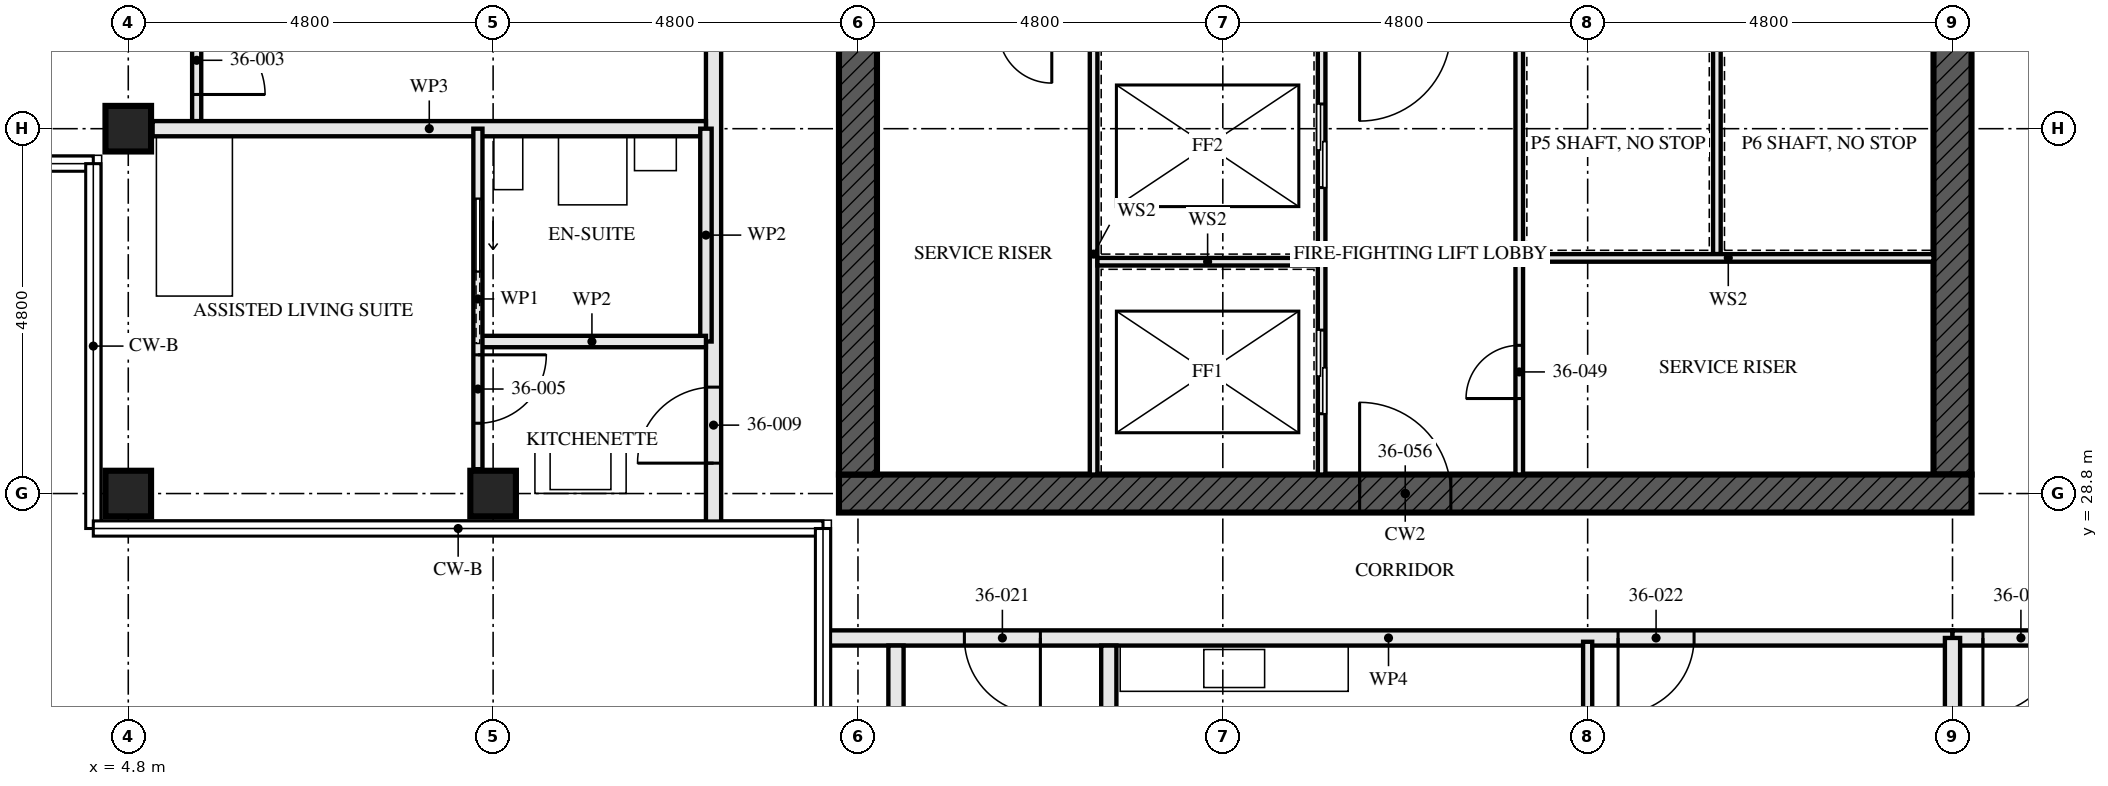
"""IFC4 building model, lengths in metres.
Left out: names, types, materials, properties, quantities, classifications, styles, units other than length and angle.
Written with IfcOpenShell. Run it as: python <this file> out.ifc"""

import sys

from ifc_helpers import new_model, si_unit, direction, frame, frame_2d, origin, origin_2d, place, context, subcontext, project, spatial, rectangle, hollow_rectangle, extrude, element, fill, save


model = new_model("IFC4")
c1 = context("Model", 3, precision=1e-05, world=origin(), true_north=direction((0.0, 1.0)))
c2 = subcontext(c1, "Body", "Model", "MODEL_VIEW")
j1 = project(units=[si_unit("LENGTHUNIT", "METRE"), si_unit("PLANEANGLEUNIT", "RADIAN")], contexts=[c1])
p1 = place(None, origin())
s1 = spatial("IfcSite", under=j1, at=p1, CompositionType="ELEMENT")
p2 = place(p1, origin())
s2 = spatial("IfcBuilding", under=s1, at=p2, CompositionType="ELEMENT")
p3 = place(p2, frame((0.0, 0.0, 133.0)))
s3 = spatial("IfcBuildingStorey", under=s2, at=p3, CompositionType="ELEMENT", Elevation=133.0)
for number, where, z_axis, x_axis in (
    (1, (4.8, 28.8, 0.0), (0.0, 0.0, 1.0), (0.0, 1.0, 0.0)),
    (2, (4.8, 33.6, 0.0), (0.0, 0.0, 1.0), (0.0, 1.0, 0.0)),
    (3, (9.6, 28.8, 0.0), (0.0, 0.0, 1.0), (0.0, 1.0, 0.0)),
):
    element("IfcColumn", number, at=place(p3, frame(where, z_axis=z_axis, x_axis=x_axis)), inside=s3, PredefinedType="COLUMN", context=c2, shape_type="SweptSolid", body=[
        extrude(hollow_rectangle(XDim=0.6, YDim=0.6, WallThickness=0.08, at=origin_2d()), origin(), (0.0, 0.0, 1.0), 3.5),
    ])
p4 = place(p3, frame((14.15, 28.8, -0.17), z_axis=(0.0, 0.0, 1.0), x_axis=(1.0, 0.0, 0.0)))
e4 = element("IfcWall", 4, at=p4, inside=s3, PredefinedType="SHEAR", context=c2, shape_type="SweptSolid", body=[
    extrude(rectangle(XDim=14.9, YDim=0.5, at=frame_2d((7.45, 0.0))), origin(), (0.0, 0.0, 1.0), 3.42),
])
p5 = place(p4, frame((6.85, 0.0, 0.17)))
e5 = element("IfcOpeningElement", 5, at=p5, cuts=e4, PredefinedType="OPENING", context=c2, shape_type="SweptSolid", body=[
    extrude(rectangle(XDim=1.2, YDim=2.1, at=frame_2d((0.6, 1.05))), frame((0.0, 0.26, 0.0), z_axis=(0.0, -1.0, 0.0), x_axis=(1.0, 0.0, 0.0)), (0.0, 0.0, 1.0), 0.521),
])
p6 = place(p3, frame((14.4, 42.95, -0.17), z_axis=(0.0, 0.0, 1.0), x_axis=(0.0, -1.0, 0.0)))
e6 = element("IfcWall", 6, at=p6, inside=s3, PredefinedType="SHEAR", context=c2, shape_type="SweptSolid", body=[
    extrude(rectangle(XDim=13.9, YDim=0.5, at=frame_2d((6.95, 0.0))), origin(), (0.0, 0.0, 1.0), 3.42),
])
p7 = place(p6, frame((6.35, 0.0, 0.17)))
e7 = element("IfcOpeningElement", 7, at=p7, cuts=e6, PredefinedType="OPENING", context=c2, shape_type="SweptSolid", body=[
    extrude(rectangle(XDim=1.2, YDim=2.1, at=frame_2d((0.6, 1.05))), frame((0.0, 0.26, 0.0), z_axis=(0.0, -1.0, 0.0), x_axis=(1.0, 0.0, 0.0)), (0.0, 0.0, 1.0), 0.521),
])
p8 = place(p3, frame((28.8, 29.05, -0.17), z_axis=(0.0, 0.0, 1.0), x_axis=(0.0, 1.0, 0.0)))
e8 = element("IfcWall", 8, at=p8, inside=s3, PredefinedType="SHEAR", context=c2, shape_type="SweptSolid", body=[
    extrude(rectangle(XDim=13.9, YDim=0.5, at=frame_2d((6.95, 0.0))), origin(), (0.0, 0.0, 1.0), 3.42),
])
p9 = place(p8, frame((6.35, 0.0, 0.17)))
e9 = element("IfcOpeningElement", 9, at=p9, cuts=e8, PredefinedType="OPENING", context=c2, shape_type="SweptSolid", body=[
    extrude(rectangle(XDim=1.2, YDim=2.1, at=frame_2d((0.6, 1.05))), frame((0.0, 0.26, 0.0), z_axis=(0.0, -1.0, 0.0), x_axis=(1.0, 0.0, 0.0)), (0.0, 0.0, 1.0), 0.521),
])
p10 = place(p3, frame((5.7, 38.4, 0.0), z_axis=(0.0, 0.0, 1.0), x_axis=(0.0, -1.0, 0.0)))
e10 = element("IfcWall", 10, at=p10, inside=s3, PredefinedType="PARTITIONING", context=c2, shape_type="SweptSolid", body=[
    extrude(rectangle(XDim=4.8, YDim=0.12, at=frame_2d((2.4, 0.0))), origin(), (0.0, 0.0, 1.0), 3.25),
])
p11 = place(p10, frame((3.45, 0.0, 0.0)))
e11 = element("IfcOpeningElement", 11, at=p11, cuts=e10, PredefinedType="OPENING", context=c2, shape_type="SweptSolid", body=[
    extrude(rectangle(XDim=0.9, YDim=2.1, at=frame_2d((0.45, 1.05))), frame((0.0, 0.071, 0.0), z_axis=(0.0, -1.0, 0.0), x_axis=(1.0, 0.0, 0.0)), (0.0, 0.0, 1.0), 0.141),
])
p12 = place(p10, frame((0.925, 0.0, 0.0)))
e12 = element("IfcOpeningElement", 12, at=p12, cuts=e10, PredefinedType="OPENING", context=c2, shape_type="SweptSolid", body=[
    extrude(rectangle(XDim=0.95, YDim=2.1, at=frame_2d((0.475, 1.05))), frame((0.0, 0.071, 0.0), z_axis=(0.0, -1.0, 0.0), x_axis=(1.0, 0.0, 0.0)), (0.0, 0.0, 1.0), 0.141),
])
p13 = place(p3, frame((5.12, 33.6, 0.0), z_axis=(0.0, 0.0, 1.0), x_axis=(1.0, 0.0, 0.0)))
e13 = element("IfcWall", 13, at=p13, inside=s3, PredefinedType="PARTITIONING", context=c2, shape_type="SweptSolid", body=[
    extrude(rectangle(XDim=7.28, YDim=0.2, at=frame_2d((3.64, 0.0))), origin(), (0.0, 0.0, 1.0), 2.24),
])
p14 = place(p3, frame((9.4, 30.8, 0.0), z_axis=(0.0, 0.0, 1.0), x_axis=(1.0, 0.0, 0.0)))
e14 = element("IfcWall", 14, at=p14, inside=s3, PredefinedType="PARTITIONING", context=c2, shape_type="SweptSolid", body=[
    extrude(rectangle(XDim=3.0, YDim=0.15, at=frame_2d((1.5, 0.0))), origin(), (0.0, 0.0, 1.0), 3.25),
])
p15 = place(p3, frame((12.4, 33.6, 0.0), z_axis=(0.0, 0.0, 1.0), x_axis=(0.0, -1.0, 0.0)))
e15 = element("IfcWall", 15, at=p15, inside=s3, PredefinedType="PARTITIONING", context=c2, shape_type="SweptSolid", body=[
    extrude(rectangle(XDim=2.8, YDim=0.15, at=frame_2d((1.4, 0.0))), origin(), (0.0, 0.0, 1.0), 3.25),
])
p16 = place(p3, frame((9.4, 33.6, 0.0), z_axis=(0.0, 0.0, 1.0), x_axis=(0.0, -1.0, 0.0)))
e16 = element("IfcWall", 16, at=p16, inside=s3, PredefinedType="PARTITIONING", context=c2, shape_type="SweptSolid", body=[
    extrude(rectangle(XDim=4.48, YDim=0.12, at=frame_2d((2.24, 0.0))), origin(), (0.0, 0.0, 1.0), 3.25),
])
p17 = place(p16, frame((2.975, 0.0, 0.0)))
e17 = element("IfcOpeningElement", 17, at=p17, cuts=e16, PredefinedType="OPENING", context=c2, shape_type="SweptSolid", body=[
    extrude(rectangle(XDim=0.9, YDim=2.1, at=frame_2d((0.45, 1.05))), frame((0.0, 0.071, 0.0), z_axis=(0.0, -1.0, 0.0), x_axis=(1.0, 0.0, 0.0)), (0.0, 0.0, 1.0), 0.141),
])
p18 = place(p16, frame((0.925, 0.0, 0.0)))
e18 = element("IfcOpeningElement", 18, at=p18, cuts=e16, PredefinedType="OPENING", context=c2, shape_type="SweptSolid", body=[
    extrude(rectangle(XDim=0.95, YDim=2.1, at=frame_2d((0.475, 1.05))), frame((0.0, 0.071, 0.0), z_axis=(0.0, -1.0, 0.0), x_axis=(1.0, 0.0, 0.0)), (0.0, 0.0, 1.0), 0.141),
])
p19 = place(p3, frame((12.5, 43.2, 0.0), z_axis=(0.0, 0.0, 1.0), x_axis=(0.0, -1.0, 0.0)))
e19 = element("IfcWall", 19, at=p19, inside=s3, PredefinedType="PARTITIONING", context=c2, shape_type="SweptSolid", body=[
    extrude(rectangle(XDim=14.84, YDim=0.2, at=frame_2d((7.42, 0.0))), origin(), (0.0, 0.0, 1.0), 2.04),
])
p20 = place(p19, frame((1.4, 0.0, 0.0)))
e20 = element("IfcOpeningElement", 20, at=p20, cuts=e19, PredefinedType="OPENING", context=c2, shape_type="SweptSolid", body=[
    extrude(rectangle(XDim=1.0, YDim=2.0, at=frame_2d((0.5, 1.0))), frame((0.0, 0.111, 0.0), z_axis=(0.0, -1.0, 0.0), x_axis=(1.0, 0.0, 0.0)), (0.0, 0.0, 1.0), 0.221),
])
p21 = place(p19, frame((5.2, 0.0, 0.0)))
e21 = element("IfcOpeningElement", 21, at=p21, cuts=e19, PredefinedType="OPENING", context=c2, shape_type="SweptSolid", body=[
    extrude(rectangle(XDim=1.0, YDim=2.0, at=frame_2d((0.5, 1.0))), frame((0.0, 0.111, 0.0), z_axis=(0.0, -1.0, 0.0), x_axis=(1.0, 0.0, 0.0)), (0.0, 0.0, 1.0), 0.221),
])
p22 = place(p19, frame((13.0, 0.0, 0.0)))
e22 = element("IfcOpeningElement", 22, at=p22, cuts=e19, PredefinedType="OPENING", context=c2, shape_type="SweptSolid", body=[
    extrude(rectangle(XDim=1.0, YDim=2.0, at=frame_2d((0.5, 1.0))), frame((0.0, 0.111, 0.0), z_axis=(0.0, -1.0, 0.0), x_axis=(1.0, 0.0, 0.0)), (0.0, 0.0, 1.0), 0.221),
])
for number, where, z_axis, x_axis in (
    (23, (14.9, 22.1, 0.0), (0.0, 0.0, 1.0), (0.0, 1.0, 0.0)),
    (24, (17.7, 22.1, 0.0), (0.0, 0.0, 1.0), (0.0, 1.0, 0.0)),
):
    element("IfcWall", number, at=place(p3, frame(where, z_axis=z_axis, x_axis=x_axis)), inside=s3, PredefinedType="SOLIDWALL", context=c2, shape_type="SweptSolid", body=[
        extrude(rectangle(XDim=4.7, YDim=0.2, at=frame_2d((2.35, 0.0))), origin(), (0.0, 0.0, 1.0), 2.94),
    ])
p23 = place(p3, frame((24.0, 20.1, 0.0), z_axis=(0.0, 0.0, 1.0), x_axis=(0.0, 1.0, 0.0)))
e25 = element("IfcWall", 25, at=p23, inside=s3, PredefinedType="PARTITIONING", context=c2, shape_type="SweptSolid", body=[
    extrude(rectangle(XDim=6.75, YDim=0.12, at=frame_2d((3.375, 0.0))), origin(), (0.0, 0.0, 1.0), 2.04),
])
p24 = place(p23, frame((2.925, 0.0, 0.0)))
e26 = element("IfcOpeningElement", 26, at=p24, cuts=e25, PredefinedType="OPENING", context=c2, shape_type="SweptSolid", body=[
    extrude(rectangle(XDim=0.9, YDim=2.0, at=frame_2d((0.45, 1.0))), frame((0.0, 0.071, 0.0), z_axis=(0.0, -1.0, 0.0), x_axis=(1.0, 0.0, 0.0)), (0.0, 0.0, 1.0), 0.141),
])
p25 = place(p3, frame((13.96, 26.9, 0.0), z_axis=(0.0, 0.0, 1.0), x_axis=(1.0, 0.0, 0.0)))
e27 = element("IfcWall", 27, at=p25, inside=s3, PredefinedType="PARTITIONING", context=c2, shape_type="SweptSolid", body=[
    extrude(rectangle(XDim=14.84, YDim=0.2, at=frame_2d((7.42, 0.0))), origin(), (0.0, 0.0, 1.0), 2.04),
])
p26 = place(p25, frame((1.84, 0.0, 0.0)))
e28 = element("IfcOpeningElement", 28, at=p26, cuts=e27, PredefinedType="OPENING", context=c2, shape_type="SweptSolid", body=[
    extrude(rectangle(XDim=1.0, YDim=2.0, at=frame_2d((0.5, 1.0))), frame((0.0, 0.111, 0.0), z_axis=(0.0, -1.0, 0.0), x_axis=(1.0, 0.0, 0.0)), (0.0, 0.0, 1.0), 0.221),
])
p27 = place(p25, frame((10.44, 0.0, 0.0)))
e29 = element("IfcOpeningElement", 29, at=p27, cuts=e27, PredefinedType="OPENING", context=c2, shape_type="SweptSolid", body=[
    extrude(rectangle(XDim=1.0, YDim=2.0, at=frame_2d((0.5, 1.0))), frame((0.0, 0.111, 0.0), z_axis=(0.0, -1.0, 0.0), x_axis=(1.0, 0.0, 0.0)), (0.0, 0.0, 1.0), 0.221),
])
p28 = place(p3, frame((28.8, 26.9, 0.0), z_axis=(0.0, 0.0, 1.0), x_axis=(1.0, 0.0, 0.0)))
e30 = element("IfcWall", 30, at=p28, inside=s3, PredefinedType="PARTITIONING", context=c2, shape_type="SweptSolid", body=[
    extrude(rectangle(XDim=9.6, YDim=0.2, at=frame_2d((4.8, 0.0))), origin(), (0.0, 0.0, 1.0), 3.25),
])
p29 = place(p28, frame((0.4, 0.0, 0.0)))
e31 = element("IfcOpeningElement", 31, at=p29, cuts=e30, PredefinedType="OPENING", context=c2, shape_type="SweptSolid", body=[
    extrude(rectangle(XDim=1.0, YDim=2.1, at=frame_2d((0.5, 1.05))), frame((0.0, 0.111, 0.0), z_axis=(0.0, -1.0, 0.0), x_axis=(1.0, 0.0, 0.0)), (0.0, 0.0, 1.0), 0.221),
])
p30 = place(p3, frame((20.5, 29.05, 0.0), z_axis=(0.0, 0.0, 1.0), x_axis=(0.0, 1.0, 0.0)))
e32 = element("IfcWall", 32, at=p30, inside=s3, PredefinedType="SOLIDWALL", context=c2, shape_type="SweptSolid", body=[
    extrude(rectangle(XDim=5.8, YDim=0.1, at=frame_2d((2.9, 0.0))), origin(), (0.0, 0.0, 1.0), 3.25),
])
p31 = place(p30, frame((0.8, 0.0, 0.0)))
e33 = element("IfcOpeningElement", 33, at=p31, cuts=e32, PredefinedType="OPENING", context=c2, shape_type="SweptSolid", body=[
    extrude(rectangle(XDim=1.1, YDim=2.3, at=frame_2d((0.55, 1.15))), frame((0.0, 0.061, 0.0), z_axis=(0.0, -1.0, 0.0), x_axis=(1.0, 0.0, 0.0)), (0.0, 0.0, 1.0), 0.121),
])
p32 = place(p30, frame((3.775, 0.0, 0.0)))
e34 = element("IfcOpeningElement", 34, at=p32, cuts=e32, PredefinedType="OPENING", context=c2, shape_type="SweptSolid", body=[
    extrude(rectangle(XDim=1.1, YDim=2.3, at=frame_2d((0.55, 1.15))), frame((0.0, 0.061, 0.0), z_axis=(0.0, -1.0, 0.0), x_axis=(1.0, 0.0, 0.0)), (0.0, 0.0, 1.0), 0.121),
])
p33 = place(p3, frame((23.1, 29.05, 0.0), z_axis=(0.0, 0.0, 1.0), x_axis=(0.0, 1.0, 0.0)))
e35 = element("IfcWall", 35, at=p33, inside=s3, PredefinedType="SOLIDWALL", context=c2, shape_type="SweptSolid", body=[
    extrude(rectangle(XDim=5.8, YDim=0.1, at=frame_2d((2.9, 0.0))), origin(), (0.0, 0.0, 1.0), 3.25),
])
p34 = place(p33, frame((1.0, 0.0, 0.0)))
e36 = element("IfcOpeningElement", 36, at=p34, cuts=e35, PredefinedType="OPENING", context=c2, shape_type="SweptSolid", body=[
    extrude(rectangle(XDim=0.7, YDim=2.1, at=frame_2d((0.35, 1.05))), frame((0.0, 0.061, 0.0), z_axis=(0.0, -1.0, 0.0), x_axis=(1.0, 0.0, 0.0)), (0.0, 0.0, 1.0), 0.121),
])
p35 = place(p3, frame((17.5, 29.05, 0.0), z_axis=(0.0, 0.0, 1.0), x_axis=(0.0, 1.0, 0.0)))
e37 = element("IfcWall", 37, at=p35, inside=s3, PredefinedType="SOLIDWALL", context=c2, shape_type="SweptSolid", body=[
    extrude(rectangle(XDim=5.8, YDim=0.1, at=frame_2d((2.9, 0.0))), origin(), (0.0, 0.0, 1.0), 3.25),
])
p36 = place(p3, frame((17.55, 31.85, 0.0), z_axis=(0.0, 0.0, 1.0), x_axis=(1.0, 0.0, 0.0)))
e38 = element("IfcWall", 38, at=p36, inside=s3, PredefinedType="SOLIDWALL", context=c2, shape_type="SweptSolid", body=[
    extrude(rectangle(XDim=2.9, YDim=0.1, at=frame_2d((1.45, 0.0))), origin(), (0.0, 0.0, 1.0), 3.25),
])
p37 = place(p3, frame((25.7, 31.95, 0.0), z_axis=(0.0, 0.0, 1.0), x_axis=(0.0, 1.0, 0.0)))
e39 = element("IfcWall", 39, at=p37, inside=s3, PredefinedType="SOLIDWALL", context=c2, shape_type="SweptSolid", body=[
    extrude(rectangle(XDim=2.9, YDim=0.1, at=frame_2d((1.45, 0.0))), origin(), (0.0, 0.0, 1.0), 3.25),
])
p38 = place(p3, frame((23.15, 31.9, 0.0), z_axis=(0.0, 0.0, 1.0), x_axis=(1.0, 0.0, 0.0)))
e40 = element("IfcWall", 40, at=p38, inside=s3, PredefinedType="SOLIDWALL", context=c2, shape_type="SweptSolid", body=[
    extrude(rectangle(XDim=5.4, YDim=0.1, at=frame_2d((2.7, 0.0))), origin(), (0.0, 0.0, 1.0), 3.25),
])
p39 = place(p3, frame((28.8, 24.345, 0.0), z_axis=(0.0, 0.0, 1.0), x_axis=(0.0, 1.0, 0.0)))
e41 = element("IfcWall", 41, at=p39, inside=s3, PredefinedType="PARTITIONING", context=c2, shape_type="SweptSolid", body=[
    extrude(rectangle(XDim=2.555, YDim=0.2, at=frame_2d((1.277, 0.0))), origin(), (0.0, 0.0, 1.0), 2.04),
])
p40 = place(p11, origin())
e42 = element("IfcDoor", 42, at=p40, inside=s3, OperationType="SINGLE_SWING_LEFT", PredefinedType="DOOR", context=c2, shape_type="SweptSolid", body=[
    extrude(rectangle(XDim=0.9, YDim=2.1, at=frame_2d((0.45, 1.05))), frame((0.0, 0.022, 0.0), z_axis=(0.0, -1.0, 0.0), x_axis=(1.0, 0.0, 0.0)), (0.0, 0.0, 1.0), 0.044),
])
fill(e11, e42)
p41 = place(p17, origin())
e43 = element("IfcDoor", 43, at=p41, inside=s3, OperationType="SINGLE_SWING_RIGHT", PredefinedType="DOOR", context=c2, shape_type="SweptSolid", body=[
    extrude(rectangle(XDim=0.9, YDim=2.1, at=frame_2d((0.45, 1.05))), frame((0.0, 0.022, 0.0), z_axis=(0.0, -1.0, 0.0), x_axis=(1.0, 0.0, 0.0)), (0.0, 0.0, 1.0), 0.044),
])
fill(e17, e43)
p42 = place(p18, origin())
e44 = element("IfcDoor", 44, at=p42, inside=s3, OperationType="SLIDING_TO_LEFT", PredefinedType="DOOR", context=c2, shape_type="SweptSolid", body=[
    extrude(rectangle(XDim=0.95, YDim=2.1, at=frame_2d((0.475, 1.05))), frame((0.0, 0.022, 0.0), z_axis=(0.0, -1.0, 0.0), x_axis=(1.0, 0.0, 0.0)), (0.0, 0.0, 1.0), 0.044),
])
fill(e18, e44)
p43 = place(p22, frame((1.0, 0.0, 0.0), z_axis=(0.0, 0.0, 1.0), x_axis=(-1.0, 0.0, 0.0)))
e45 = element("IfcDoor", 45, at=p43, inside=s3, OperationType="SINGLE_SWING_RIGHT", PredefinedType="DOOR", context=c2, shape_type="SweptSolid", body=[
    extrude(rectangle(XDim=1.0, YDim=2.0, at=frame_2d((0.5, 1.0))), frame((0.0, 0.027, 0.0), z_axis=(0.0, -1.0, 0.0), x_axis=(1.0, 0.0, 0.0)), (0.0, 0.0, 1.0), 0.054),
])
fill(e22, e45)
p44 = place(p26, frame((1.0, 0.0, 0.0), z_axis=(0.0, 0.0, 1.0), x_axis=(-1.0, 0.0, 0.0)))
e46 = element("IfcDoor", 46, at=p44, inside=s3, OperationType="SINGLE_SWING_RIGHT", PredefinedType="DOOR", context=c2, shape_type="SweptSolid", body=[
    extrude(rectangle(XDim=1.0, YDim=2.0, at=frame_2d((0.5, 1.0))), frame((0.0, 0.032, 0.0), z_axis=(0.0, -1.0, 0.0), x_axis=(1.0, 0.0, 0.0)), (0.0, 0.0, 1.0), 0.064),
])
fill(e28, e46)
p45 = place(p27, frame((1.0, 0.0, 0.0), z_axis=(0.0, 0.0, 1.0), x_axis=(-1.0, 0.0, 0.0)))
e47 = element("IfcDoor", 47, at=p45, inside=s3, OperationType="SINGLE_SWING_LEFT", PredefinedType="DOOR", context=c2, shape_type="SweptSolid", body=[
    extrude(rectangle(XDim=1.0, YDim=2.0, at=frame_2d((0.5, 1.0))), frame((0.0, 0.027, 0.0), z_axis=(0.0, -1.0, 0.0), x_axis=(1.0, 0.0, 0.0)), (0.0, 0.0, 1.0), 0.054),
])
fill(e29, e47)
p46 = place(p29, frame((1.0, 0.0, 0.0), z_axis=(0.0, 0.0, 1.0), x_axis=(-1.0, 0.0, 0.0)))
e48 = element("IfcDoor", 48, at=p46, inside=s3, OperationType="SINGLE_SWING_LEFT", PredefinedType="DOOR", context=c2, shape_type="SweptSolid", body=[
    extrude(rectangle(XDim=1.0, YDim=2.1, at=frame_2d((0.5, 1.05))), frame((0.0, 0.027, 0.0), z_axis=(0.0, -1.0, 0.0), x_axis=(1.0, 0.0, 0.0)), (0.0, 0.0, 1.0), 0.054),
])
fill(e31, e48)
p47 = place(p31, origin())
e49 = element("IfcDoor", 49, at=p47, inside=s3, OperationType="SLIDING_TO_LEFT", PredefinedType="DOOR", context=c2, shape_type="SweptSolid", body=[
    extrude(rectangle(XDim=1.1, YDim=2.3, at=frame_2d((0.55, 1.15))), frame((0.0, 0.05, 0.0), z_axis=(0.0, -1.0, 0.0), x_axis=(1.0, 0.0, 0.0)), (0.0, 0.0, 1.0), 0.1),
])
fill(e33, e49)
p48 = place(p32, origin())
e50 = element("IfcDoor", 50, at=p48, inside=s3, OperationType="SLIDING_TO_LEFT", PredefinedType="DOOR", context=c2, shape_type="SweptSolid", body=[
    extrude(rectangle(XDim=1.1, YDim=2.3, at=frame_2d((0.55, 1.15))), frame((0.0, 0.05, 0.0), z_axis=(0.0, -1.0, 0.0), x_axis=(1.0, 0.0, 0.0)), (0.0, 0.0, 1.0), 0.1),
])
fill(e34, e50)
p49 = place(p34, origin())
e51 = element("IfcDoor", 51, at=p49, inside=s3, OperationType="SINGLE_SWING_RIGHT", PredefinedType="DOOR", context=c2, shape_type="SweptSolid", body=[
    extrude(rectangle(XDim=0.7, YDim=2.1, at=frame_2d((0.35, 1.05))), frame((0.0, 0.027, 0.0), z_axis=(0.0, -1.0, 0.0), x_axis=(1.0, 0.0, 0.0)), (0.0, 0.0, 1.0), 0.054),
])
fill(e36, e51)
p50 = place(p5, origin())
e52 = element("IfcDoor", 52, at=p50, inside=s3, OperationType="SINGLE_SWING_LEFT", PredefinedType="DOOR", context=c2, shape_type="SweptSolid", body=[
    extrude(rectangle(XDim=1.2, YDim=2.1, at=frame_2d((0.6, 1.05))), frame((0.0, 0.027, 0.0), z_axis=(0.0, -1.0, 0.0), x_axis=(1.0, 0.0, 0.0)), (0.0, 0.0, 1.0), 0.054),
])
fill(e5, e52)
save(model, sys.argv[1])
